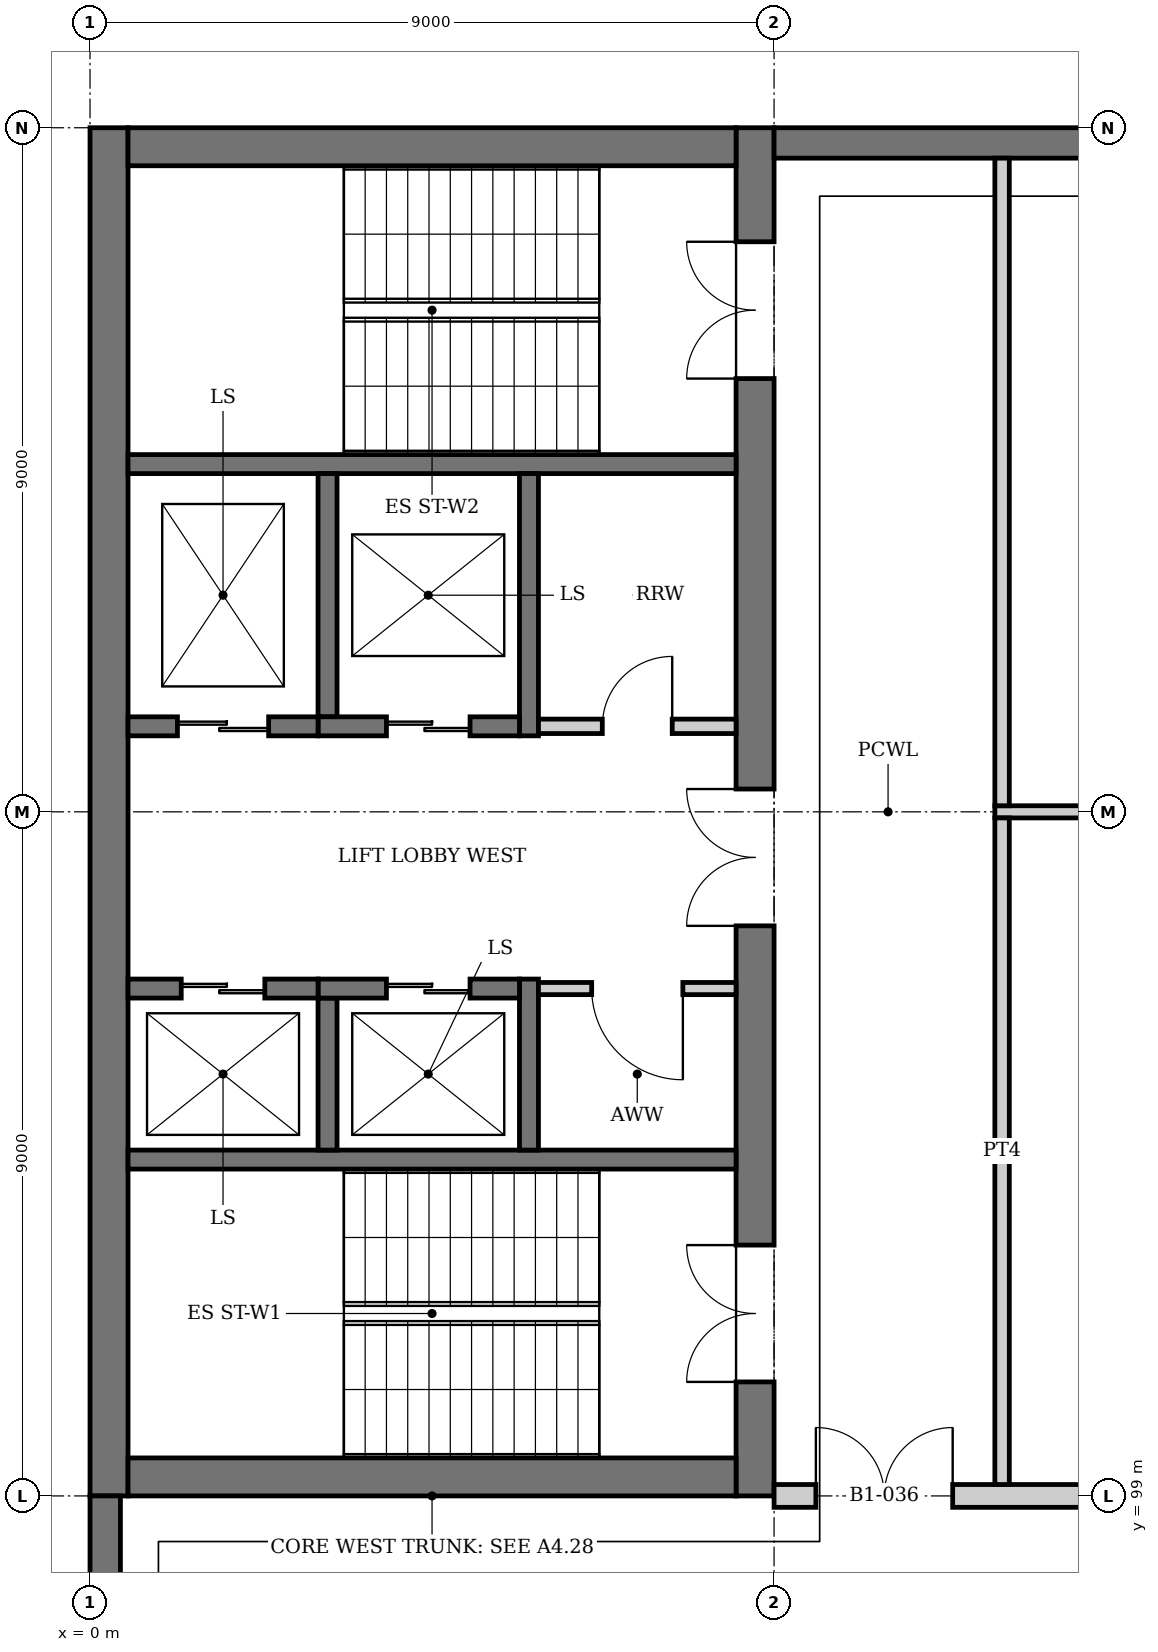
"""IFC4 building model, lengths in metres.
Left out: names, types, materials, properties, quantities, classifications, styles, units other than length and angle.
Written with IfcOpenShell. Run it as: python <this file> out.ifc"""

import sys

from ifc_helpers import new_model, si_unit, direction, frame, frame_2d, origin, place, context, subcontext, project, spatial, rectangle, extrude, element, fill, save


model = new_model("IFC4")
c1 = context("Model", 3, precision=1e-05, world=origin(), true_north=direction((0.0, 1.0)))
c2 = subcontext(c1, "Body", "Model", "MODEL_VIEW")
j1 = project(units=[si_unit("LENGTHUNIT", "METRE"), si_unit("PLANEANGLEUNIT", "RADIAN")], contexts=[c1])
p1 = place(None, origin())
s1 = spatial("IfcSite", under=j1, at=p1, CompositionType="ELEMENT")
p2 = place(p1, origin())
s2 = spatial("IfcBuilding", under=s1, at=p2, CompositionType="ELEMENT")
p3 = place(p2, frame((0.0, 0.0, -4.5)))
s3 = spatial("IfcBuildingStorey", under=s2, at=p3, CompositionType="ELEMENT", Elevation=-4.5)
p4 = place(p3, frame((0.25, 99.0, 0.0), z_axis=(0.0, 0.0, 1.0), x_axis=(0.0, 1.0, 0.0)))
e1 = element("IfcWall", 1, at=p4, inside=s3, PredefinedType="SHEAR", context=c2, shape_type="SweptSolid", body=[
    extrude(rectangle(XDim=18.0, YDim=0.5, at=frame_2d((9.0, 0.0))), origin(), (0.0, 0.0, 1.0), 4.5),
])
p5 = place(p3, frame((8.75, 99.0, 0.0), z_axis=(0.0, 0.0, 1.0), x_axis=(0.0, 1.0, 0.0)))
e2 = element("IfcWall", 2, at=p5, inside=s3, PredefinedType="SHEAR", context=c2, shape_type="SweptSolid", body=[
    extrude(rectangle(XDim=18.0, YDim=0.5, at=frame_2d((9.0, 0.0))), origin(), (0.0, 0.0, 1.0), 4.5),
])
p6 = place(p5, frame((1.5, 0.0, 0.0)))
e3 = element("IfcOpeningElement", 3, at=p6, cuts=e2, PredefinedType="OPENING", context=c2, shape_type="SweptSolid", body=[
    extrude(rectangle(XDim=1.8, YDim=2.1, at=frame_2d((0.9, 1.05))), frame((0.0, 0.26, 0.0), z_axis=(0.0, -1.0, 0.0), x_axis=(1.0, 0.0, 0.0)), (0.0, 0.0, 1.0), 0.52),
])
p7 = place(p5, frame((14.7, 0.0, 0.0)))
e4 = element("IfcOpeningElement", 4, at=p7, cuts=e2, PredefinedType="OPENING", context=c2, shape_type="SweptSolid", body=[
    extrude(rectangle(XDim=1.8, YDim=2.1, at=frame_2d((0.9, 1.05))), frame((0.0, 0.26, 0.0), z_axis=(0.0, -1.0, 0.0), x_axis=(1.0, 0.0, 0.0)), (0.0, 0.0, 1.0), 0.52),
])
p8 = place(p5, frame((7.5, 0.0, 0.0)))
e5 = element("IfcOpeningElement", 5, at=p8, cuts=e2, PredefinedType="OPENING", context=c2, shape_type="SweptSolid", body=[
    extrude(rectangle(XDim=1.8, YDim=2.1, at=frame_2d((0.9, 1.05))), frame((0.0, 0.26, 0.0), z_axis=(0.0, -1.0, 0.0), x_axis=(1.0, 0.0, 0.0)), (0.0, 0.0, 1.0), 0.52),
])
for number, where, z_axis, x_axis in (
    (6, (0.5, 99.25, 0.0), (0.0, 0.0, 1.0), (1.0, 0.0, 0.0)),
    (7, (0.5, 116.75, 0.0), (0.0, 0.0, 1.0), (1.0, 0.0, 0.0)),
):
    element("IfcWall", number, at=place(p3, frame(where, z_axis=z_axis, x_axis=x_axis)), inside=s3, PredefinedType="SHEAR", context=c2, shape_type="SweptSolid", body=[
        extrude(rectangle(XDim=8.0, YDim=0.5, at=frame_2d((4.0, 0.0))), origin(), (0.0, 0.0, 1.0), 4.5),
    ])
p9 = place(p3, frame((0.2, 90.008, 0.0), z_axis=(0.0, 0.0, 1.0), x_axis=(0.0, 1.0, 0.0)))
e8 = element("IfcWall", 8, at=p9, inside=s3, PredefinedType="SOLIDWALL", context=c2, shape_type="SweptSolid", body=[
    extrude(rectangle(XDim=8.992, YDim=0.4, at=frame_2d((4.496, 0.0))), origin(), (0.0, 0.0, 1.0), 4.5),
])
p10 = place(p3, frame((9.0, 116.8, 0.0), z_axis=(0.0, 0.0, 1.0), x_axis=(1.0, 0.0, 0.0)))
e9 = element("IfcWall", 9, at=p10, inside=s3, PredefinedType="SOLIDWALL", context=c2, shape_type="SweptSolid", body=[
    extrude(rectangle(XDim=8.8, YDim=0.4, at=frame_2d((4.4, 0.0))), origin(), (0.0, 0.0, 1.0), 4.5),
])
p11 = place(p3, frame((9.0, 99.0, 0.0), z_axis=(0.0, 0.0, 1.0), x_axis=(1.0, 0.0, 0.0)))
e10 = element("IfcWall", 10, at=p11, inside=s3, PredefinedType="PARTITIONING", context=c2, shape_type="SweptSolid", body=[
    extrude(rectangle(XDim=8.75, YDim=0.3, at=frame_2d((4.375, 0.0))), origin(), (0.0, 0.0, 1.0), 3.34),
])
p12 = place(p11, frame((0.55, 0.0, 0.0)))
e11 = element("IfcOpeningElement", 11, at=p12, cuts=e10, PredefinedType="OPENING", context=c2, shape_type="SweptSolid", body=[
    extrude(rectangle(XDim=1.8, YDim=2.1, at=frame_2d((0.9, 1.05))), frame((0.0, 0.16, 0.0), z_axis=(0.0, -1.0, 0.0), x_axis=(1.0, 0.0, 0.0)), (0.0, 0.0, 1.0), 0.32),
])
p13 = place(p3, frame((11.905, 108.0, 0.0), z_axis=(0.0, 0.0, 1.0), x_axis=(1.0, 0.0, 0.0)))
e12 = element("IfcWall", 12, at=p13, inside=s3, PredefinedType="PARTITIONING", context=c2, shape_type="SweptSolid", body=[
    extrude(rectangle(XDim=15.69, YDim=0.16, at=frame_2d((7.845, 0.0))), origin(), (0.0, 0.0, 1.0), 3.35),
])
p14 = place(p3, frame((12.0, 99.15, 0.0), z_axis=(0.0, 0.0, 1.0), x_axis=(0.0, 1.0, 0.0)))
e13 = element("IfcWall", 13, at=p14, inside=s3, PredefinedType="PARTITIONING", context=c2, shape_type="SweptSolid", body=[
    extrude(rectangle(XDim=8.77, YDim=0.19, at=frame_2d((4.385, 0.0))), origin(), (0.0, 0.0, 1.0), 3.34),
])
p15 = place(p3, frame((12.0, 108.08, 0.0), z_axis=(0.0, 0.0, 1.0), x_axis=(0.0, 1.0, 0.0)))
e14 = element("IfcWall", 14, at=p15, inside=s3, PredefinedType="PARTITIONING", context=c2, shape_type="SweptSolid", body=[
    extrude(rectangle(XDim=8.52, YDim=0.19, at=frame_2d((4.26, 0.0))), origin(), (0.0, 0.0, 1.0), 4.25),
])
for number, where, z_axis, x_axis in (
    (15, (8.5, 103.425, 0.0), (0.0, 0.0, 1.0), (-1.0, 0.0, 0.0)),
    (16, (8.5, 112.575, 0.0), (0.0, 0.0, 1.0), (-1.0, 0.0, 0.0)),
):
    element("IfcWall", number, at=place(p3, frame(where, z_axis=z_axis, x_axis=x_axis)), inside=s3, PredefinedType="SOLIDWALL", context=c2, shape_type="SweptSolid", body=[
        extrude(rectangle(XDim=8.0, YDim=0.25, at=frame_2d((4.0, 0.0))), origin(), (0.0, 0.0, 1.0), 4.25),
    ])
p16 = place(p3, frame((5.775, 103.55, 0.0), z_axis=(0.0, 0.0, 1.0), x_axis=(0.0, 1.0, 0.0)))
e17 = element("IfcWall", 17, at=p16, inside=s3, PredefinedType="SOLIDWALL", context=c2, shape_type="SweptSolid", body=[
    extrude(rectangle(XDim=2.25, YDim=0.25, at=frame_2d((1.125, 0.0))), origin(), (0.0, 0.0, 1.0), 4.5),
])
p17 = place(p3, frame((3.125, 103.55, 0.0), z_axis=(0.0, 0.0, 1.0), x_axis=(0.0, 1.0, 0.0)))
e18 = element("IfcWall", 18, at=p17, inside=s3, PredefinedType="SOLIDWALL", context=c2, shape_type="SweptSolid", body=[
    extrude(rectangle(XDim=2.0, YDim=0.25, at=frame_2d((1.0, 0.0))), origin(), (0.0, 0.0, 1.0), 4.5),
])
p18 = place(p3, frame((5.65, 105.675, 0.0), z_axis=(0.0, 0.0, 1.0), x_axis=(-1.0, 0.0, 0.0)))
e19 = element("IfcWall", 19, at=p18, inside=s3, PredefinedType="SOLIDWALL", context=c2, shape_type="SweptSolid", body=[
    extrude(rectangle(XDim=2.65, YDim=0.25, at=frame_2d((1.325, 0.0))), origin(), (0.0, 0.0, 1.0), 4.5),
])
p19 = place(p18, frame((0.65, 0.0, 0.0)))
e20 = element("IfcOpeningElement", 20, at=p19, cuts=e19, PredefinedType="OPENING", context=c2, shape_type="SweptSolid", body=[
    extrude(rectangle(XDim=1.1, YDim=2.1, at=frame_2d((0.55, 1.05))), frame((0.0, 0.135, 0.0), z_axis=(0.0, -1.0, 0.0), x_axis=(1.0, 0.0, 0.0)), (0.0, 0.0, 1.0), 0.27),
])
p20 = place(p3, frame((3.0, 105.675, 0.0), z_axis=(0.0, 0.0, 1.0), x_axis=(-1.0, 0.0, 0.0)))
e21 = element("IfcWall", 21, at=p20, inside=s3, PredefinedType="SOLIDWALL", context=c2, shape_type="SweptSolid", body=[
    extrude(rectangle(XDim=2.5, YDim=0.25, at=frame_2d((1.25, 0.0))), origin(), (0.0, 0.0, 1.0), 4.5),
])
p21 = place(p20, frame((0.7, 0.0, 0.0)))
e22 = element("IfcOpeningElement", 22, at=p21, cuts=e21, PredefinedType="OPENING", context=c2, shape_type="SweptSolid", body=[
    extrude(rectangle(XDim=1.1, YDim=2.1, at=frame_2d((0.55, 1.05))), frame((0.0, 0.135, 0.0), z_axis=(0.0, -1.0, 0.0), x_axis=(1.0, 0.0, 0.0)), (0.0, 0.0, 1.0), 0.27),
])
p22 = place(p3, frame((5.775, 109.0, 0.0), z_axis=(0.0, 0.0, 1.0), x_axis=(0.0, 1.0, 0.0)))
e23 = element("IfcWall", 23, at=p22, inside=s3, PredefinedType="SOLIDWALL", context=c2, shape_type="SweptSolid", body=[
    extrude(rectangle(XDim=3.45, YDim=0.25, at=frame_2d((1.725, 0.0))), origin(), (0.0, 0.0, 1.0), 4.5),
])
p23 = place(p3, frame((3.125, 109.25, 0.0), z_axis=(0.0, 0.0, 1.0), x_axis=(0.0, 1.0, 0.0)))
e24 = element("IfcWall", 24, at=p23, inside=s3, PredefinedType="SOLIDWALL", context=c2, shape_type="SweptSolid", body=[
    extrude(rectangle(XDim=3.2, YDim=0.25, at=frame_2d((1.6, 0.0))), origin(), (0.0, 0.0, 1.0), 4.5),
])
p24 = place(p3, frame((5.65, 109.125, 0.0), z_axis=(0.0, 0.0, 1.0), x_axis=(-1.0, 0.0, 0.0)))
e25 = element("IfcWall", 25, at=p24, inside=s3, PredefinedType="SOLIDWALL", context=c2, shape_type="SweptSolid", body=[
    extrude(rectangle(XDim=2.65, YDim=0.25, at=frame_2d((1.325, 0.0))), origin(), (0.0, 0.0, 1.0), 4.5),
])
p25 = place(p24, frame((0.65, 0.0, 0.0)))
e26 = element("IfcOpeningElement", 26, at=p25, cuts=e25, PredefinedType="OPENING", context=c2, shape_type="SweptSolid", body=[
    extrude(rectangle(XDim=1.1, YDim=2.1, at=frame_2d((0.55, 1.05))), frame((0.0, 0.135, 0.0), z_axis=(0.0, -1.0, 0.0), x_axis=(1.0, 0.0, 0.0)), (0.0, 0.0, 1.0), 0.27),
])
p26 = place(p3, frame((3.0, 109.125, 0.0), z_axis=(0.0, 0.0, 1.0), x_axis=(-1.0, 0.0, 0.0)))
e27 = element("IfcWall", 27, at=p26, inside=s3, PredefinedType="SOLIDWALL", context=c2, shape_type="SweptSolid", body=[
    extrude(rectangle(XDim=2.5, YDim=0.25, at=frame_2d((1.25, 0.0))), origin(), (0.0, 0.0, 1.0), 4.5),
])
p27 = place(p26, frame((0.65, 0.0, 0.0)))
e28 = element("IfcOpeningElement", 28, at=p27, cuts=e27, PredefinedType="OPENING", context=c2, shape_type="SweptSolid", body=[
    extrude(rectangle(XDim=1.2, YDim=2.1, at=frame_2d((0.6, 1.05))), frame((0.0, 0.135, 0.0), z_axis=(0.0, -1.0, 0.0), x_axis=(1.0, 0.0, 0.0)), (0.0, 0.0, 1.0), 0.27),
])
p28 = place(p3, frame((8.5, 105.675, 0.0), z_axis=(0.0, 0.0, 1.0), x_axis=(-1.0, 0.0, 0.0)))
e29 = element("IfcWall", 29, at=p28, inside=s3, PredefinedType="PARTITIONING", context=c2, shape_type="SweptSolid", body=[
    extrude(rectangle(XDim=2.6, YDim=0.16, at=frame_2d((1.3, 0.0))), origin(), (0.0, 0.0, 1.0), 4.25),
])
p29 = place(p28, frame((0.7, 0.0, 0.0)))
e30 = element("IfcOpeningElement", 30, at=p29, cuts=e29, PredefinedType="OPENING", context=c2, shape_type="SweptSolid", body=[
    extrude(rectangle(XDim=1.2, YDim=2.1, at=frame_2d((0.6, 1.05))), frame((0.0, 0.09, 0.0), z_axis=(0.0, -1.0, 0.0), x_axis=(1.0, 0.0, 0.0)), (0.0, 0.0, 1.0), 0.18),
])
p30 = place(p3, frame((8.5, 109.125, 0.0), z_axis=(0.0, 0.0, 1.0), x_axis=(-1.0, 0.0, 0.0)))
e31 = element("IfcWall", 31, at=p30, inside=s3, PredefinedType="PARTITIONING", context=c2, shape_type="SweptSolid", body=[
    extrude(rectangle(XDim=2.6, YDim=0.19, at=frame_2d((1.3, 0.0))), origin(), (0.0, 0.0, 1.0), 4.25),
])
p31 = place(p30, frame((0.84, 0.0, 0.0)))
e32 = element("IfcOpeningElement", 32, at=p31, cuts=e31, PredefinedType="OPENING", context=c2, shape_type="SweptSolid", body=[
    extrude(rectangle(XDim=0.92, YDim=2.1, at=frame_2d((0.46, 1.05))), frame((0.0, 0.105, 0.0), z_axis=(0.0, -1.0, 0.0), x_axis=(1.0, 0.0, 0.0)), (0.0, 0.0, 1.0), 0.21),
])
p32 = place(p12, origin())
e33 = element("IfcDoor", 33, at=p32, inside=s3, OperationType="DOUBLE_DOOR_SINGLE_SWING", PredefinedType="DOOR", context=c2, shape_type="SweptSolid", body=[
    extrude(rectangle(XDim=1.8, YDim=2.1, at=frame_2d((0.9, 1.05))), frame((0.0, 0.025, 0.0), z_axis=(0.0, -1.0, 0.0), x_axis=(1.0, 0.0, 0.0)), (0.0, 0.0, 1.0), 0.05),
])
fill(e11, e33)
p33 = place(p19, origin())
e34 = element("IfcDoor", 34, at=p33, inside=s3, OperationType="DOUBLE_DOOR_SLIDING", PredefinedType="DOOR", context=c2, shape_type="SweptSolid", body=[
    extrude(rectangle(XDim=1.1, YDim=2.1, at=frame_2d((0.55, 1.05))), frame((0.0, 0.025, 0.0), z_axis=(0.0, -1.0, 0.0), x_axis=(1.0, 0.0, 0.0)), (0.0, 0.0, 1.0), 0.05),
])
fill(e20, e34)
p34 = place(p21, origin())
e35 = element("IfcDoor", 35, at=p34, inside=s3, OperationType="DOUBLE_DOOR_SLIDING", PredefinedType="DOOR", context=c2, shape_type="SweptSolid", body=[
    extrude(rectangle(XDim=1.1, YDim=2.1, at=frame_2d((0.55, 1.05))), frame((0.0, 0.025, 0.0), z_axis=(0.0, -1.0, 0.0), x_axis=(1.0, 0.0, 0.0)), (0.0, 0.0, 1.0), 0.05),
])
fill(e22, e35)
p35 = place(p25, origin())
e36 = element("IfcDoor", 36, at=p35, inside=s3, OperationType="DOUBLE_DOOR_SLIDING", PredefinedType="DOOR", context=c2, shape_type="SweptSolid", body=[
    extrude(rectangle(XDim=1.1, YDim=2.1, at=frame_2d((0.55, 1.05))), frame((0.0, 0.025, 0.0), z_axis=(0.0, -1.0, 0.0), x_axis=(1.0, 0.0, 0.0)), (0.0, 0.0, 1.0), 0.05),
])
fill(e26, e36)
p36 = place(p27, origin())
e37 = element("IfcDoor", 37, at=p36, inside=s3, OperationType="DOUBLE_DOOR_SLIDING", PredefinedType="DOOR", context=c2, shape_type="SweptSolid", body=[
    extrude(rectangle(XDim=1.2, YDim=2.1, at=frame_2d((0.6, 1.05))), frame((0.0, 0.025, 0.0), z_axis=(0.0, -1.0, 0.0), x_axis=(1.0, 0.0, 0.0)), (0.0, 0.0, 1.0), 0.05),
])
fill(e28, e37)
p37 = place(p6, origin())
e38 = element("IfcDoor", 38, at=p37, inside=s3, OperationType="DOUBLE_DOOR_SINGLE_SWING", PredefinedType="DOOR", context=c2, shape_type="SweptSolid", body=[
    extrude(rectangle(XDim=1.8, YDim=2.1, at=frame_2d((0.9, 1.05))), frame((0.0, 0.025, 0.0), z_axis=(0.0, -1.0, 0.0), x_axis=(1.0, 0.0, 0.0)), (0.0, 0.0, 1.0), 0.05),
])
fill(e3, e38)
p38 = place(p7, origin())
e39 = element("IfcDoor", 39, at=p38, inside=s3, OperationType="DOUBLE_DOOR_SINGLE_SWING", PredefinedType="DOOR", context=c2, shape_type="SweptSolid", body=[
    extrude(rectangle(XDim=1.8, YDim=2.1, at=frame_2d((0.9, 1.05))), frame((0.0, 0.025, 0.0), z_axis=(0.0, -1.0, 0.0), x_axis=(1.0, 0.0, 0.0)), (0.0, 0.0, 1.0), 0.05),
])
fill(e4, e39)
p39 = place(p8, origin())
e40 = element("IfcDoor", 40, at=p39, inside=s3, OperationType="DOUBLE_DOOR_SINGLE_SWING", PredefinedType="DOOR", context=c2, shape_type="SweptSolid", body=[
    extrude(rectangle(XDim=1.8, YDim=2.1, at=frame_2d((0.9, 1.05))), frame((0.0, 0.025, 0.0), z_axis=(0.0, -1.0, 0.0), x_axis=(1.0, 0.0, 0.0)), (0.0, 0.0, 1.0), 0.05),
])
fill(e5, e40)
p40 = place(p29, origin())
e41 = element("IfcDoor", 41, at=p40, inside=s3, OperationType="SINGLE_SWING_LEFT", PredefinedType="DOOR", context=c2, shape_type="SweptSolid", body=[
    extrude(rectangle(XDim=1.2, YDim=2.1, at=frame_2d((0.6, 1.05))), frame((0.0, 0.025, 0.0), z_axis=(0.0, -1.0, 0.0), x_axis=(1.0, 0.0, 0.0)), (0.0, 0.0, 1.0), 0.05),
])
fill(e30, e41)
p41 = place(p31, frame((0.92, 0.0, 0.0), z_axis=(0.0, 0.0, 1.0), x_axis=(-1.0, 0.0, 0.0)))
e42 = element("IfcDoor", 42, at=p41, inside=s3, OperationType="SINGLE_SWING_RIGHT", PredefinedType="DOOR", context=c2, shape_type="SweptSolid", body=[
    extrude(rectangle(XDim=0.92, YDim=2.1, at=frame_2d((0.46, 1.05))), frame((0.0, 0.025, 0.0), z_axis=(0.0, -1.0, 0.0), x_axis=(1.0, 0.0, 0.0)), (0.0, 0.0, 1.0), 0.05),
])
fill(e32, e42)
save(model, sys.argv[1])
